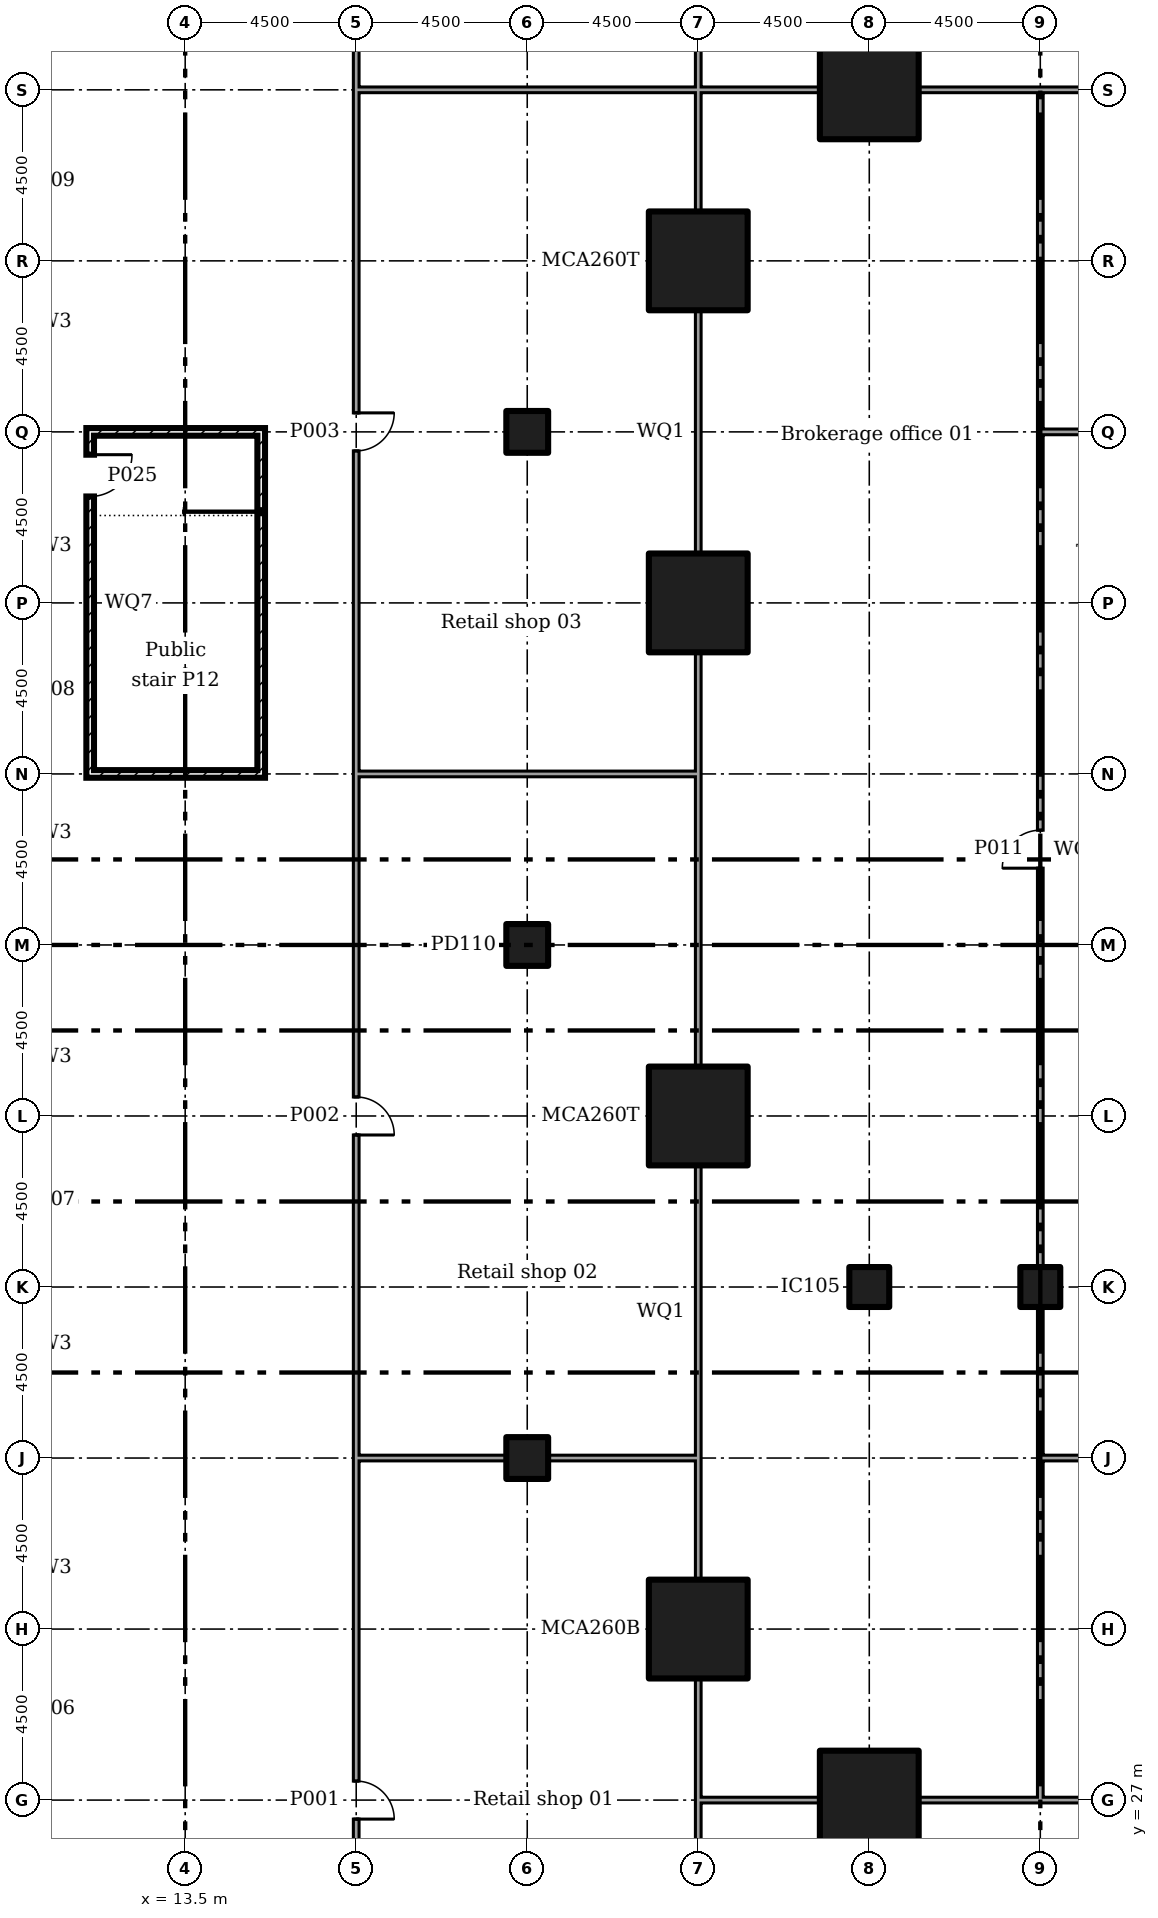
"""IFC4 building model, lengths in metres.
Left out: names, types, materials, properties, quantities, classifications, styles, units other than length and angle.
Written with IfcOpenShell. Run it as: python <this file> out.ifc"""

import sys

from ifc_helpers import new_model, si_unit, direction, frame, frame_2d, origin, origin_2d, place, context, subcontext, project, spatial, rectangle, extrude, element, fill, save


model = new_model("IFC4")
c1 = context("Model", 3, precision=1e-05, world=origin(), true_north=direction((0.0, 1.0)))
c2 = subcontext(c1, "Body", "Model", "MODEL_VIEW")
j1 = project(units=[si_unit("LENGTHUNIT", "METRE"), si_unit("PLANEANGLEUNIT", "RADIAN")], contexts=[c1])
p1 = place(None, origin())
s1 = spatial("IfcSite", under=j1, at=p1, CompositionType="ELEMENT")
p2 = place(p1, origin())
s2 = spatial("IfcBuilding", under=s1, at=p2, CompositionType="ELEMENT")
p3 = place(p2, frame((0.0, 0.0, 6.0)))
s3 = spatial("IfcBuildingStorey", under=s2, at=p3, CompositionType="ELEMENT", Elevation=6.0)
for number, where in (
    (1, (27.0, 31.5, 0.0)),
    (2, (27.0, 45.0, 0.0)),
    (3, (27.0, 58.5, 0.0)),
    (4, (27.0, 67.5, 0.0)),
    (5, (31.5, 27.0, 0.0)),
    (6, (31.5, 72.0, 0.0)),
):
    element("IfcColumn", number, at=place(p3, frame(where)), inside=s3, PredefinedType="COLUMN", context=c2, shape_type="SweptSolid", body=[
        extrude(rectangle(XDim=2.6, YDim=2.6, at=origin_2d()), origin(), (0.0, 0.0, 1.0), 5.5),
    ])
for number, where in (
    (7, (31.5, 40.5, 0.0)),
    (8, (36.0, 40.5, 0.0)),
):
    element("IfcColumn", number, at=place(p3, frame(where)), inside=s3, PredefinedType="COLUMN", context=c2, shape_type="SweptSolid", body=[
        extrude(rectangle(XDim=1.05, YDim=1.05, at=origin_2d()), origin(), (0.0, 0.0, 1.0), 5.5),
    ])
for number, where in (
    (9, (22.5, 36.0, 0.0)),
    (10, (22.5, 49.5, 0.0)),
    (11, (22.5, 63.0, 0.0)),
):
    element("IfcColumn", number, at=place(p3, frame(where)), inside=s3, PredefinedType="COLUMN", context=c2, shape_type="SweptSolid", body=[
        extrude(rectangle(XDim=1.1, YDim=1.1, at=origin_2d()), origin(), (0.0, 0.0, 1.0), 5.5),
    ])
p4 = place(p3, frame((18.0, 18.0, 0.0), z_axis=(0.0, 0.0, 1.0), x_axis=(0.0, 1.0, 0.0)))
e12 = element("IfcWall", 12, at=p4, inside=s3, PredefinedType="PARTITIONING", context=c2, shape_type="SweptSolid", body=[
    extrude(rectangle(XDim=18.075, YDim=0.15, at=frame_2d((9.038, 0.0))), origin(), (0.0, 0.0, 1.0), 5.05),
])
p5 = place(p4, frame((8.5, 0.0, 0.0)))
e13 = element("IfcOpeningElement", 13, at=p5, cuts=e12, PredefinedType="OPENING", context=c2, shape_type="SweptSolid", body=[
    extrude(rectangle(XDim=1.0, YDim=2.1, at=frame_2d((0.5, 1.05))), frame((0.0, 0.085, 0.0), z_axis=(0.0, -1.0, 0.0), x_axis=(1.0, 0.0, 0.0)), (0.0, 0.0, 1.0), 0.17),
])
p6 = place(p3, frame((18.0, 36.0, 0.0), z_axis=(0.0, 0.0, 1.0), x_axis=(0.0, 1.0, 0.0)))
e14 = element("IfcWall", 14, at=p6, inside=s3, PredefinedType="PARTITIONING", context=c2, shape_type="SweptSolid", body=[
    extrude(rectangle(XDim=18.075, YDim=0.15, at=frame_2d((9.038, 0.0))), origin(), (0.0, 0.0, 1.0), 5.05),
])
p7 = place(p6, frame((8.5, 0.0, 0.0)))
e15 = element("IfcOpeningElement", 15, at=p7, cuts=e14, PredefinedType="OPENING", context=c2, shape_type="SweptSolid", body=[
    extrude(rectangle(XDim=1.0, YDim=2.1, at=frame_2d((0.5, 1.05))), frame((0.0, 0.085, 0.0), z_axis=(0.0, -1.0, 0.0), x_axis=(1.0, 0.0, 0.0)), (0.0, 0.0, 1.0), 0.17),
])
p8 = place(p3, frame((18.0, 54.0, 0.0), z_axis=(0.0, 0.0, 1.0), x_axis=(0.0, 1.0, 0.0)))
e16 = element("IfcWall", 16, at=p8, inside=s3, PredefinedType="PARTITIONING", context=c2, shape_type="SweptSolid", body=[
    extrude(rectangle(XDim=18.075, YDim=0.15, at=frame_2d((9.038, 0.0))), origin(), (0.0, 0.0, 1.0), 5.05),
])
p9 = place(p8, frame((8.5, 0.0, 0.0)))
e17 = element("IfcOpeningElement", 17, at=p9, cuts=e16, PredefinedType="OPENING", context=c2, shape_type="SweptSolid", body=[
    extrude(rectangle(XDim=1.0, YDim=2.1, at=frame_2d((0.5, 1.05))), frame((0.0, 0.085, 0.0), z_axis=(0.0, -1.0, 0.0), x_axis=(1.0, 0.0, 0.0)), (0.0, 0.0, 1.0), 0.17),
])
p10 = place(p3, frame((18.0, 72.0, 0.0), z_axis=(0.0, 0.0, 1.0), x_axis=(0.0, 1.0, 0.0)))
e18 = element("IfcWall", 18, at=p10, inside=s3, PredefinedType="PARTITIONING", context=c2, shape_type="SweptSolid", body=[
    extrude(rectangle(XDim=9.0, YDim=0.15, at=frame_2d((4.5, 0.0))), origin(), (0.0, 0.0, 1.0), 5.05),
])
p11 = place(p10, frame((4.0, 0.0, 0.0)))
e19 = element("IfcOpeningElement", 19, at=p11, cuts=e18, PredefinedType="OPENING", context=c2, shape_type="SweptSolid", body=[
    extrude(rectangle(XDim=1.0, YDim=2.1, at=frame_2d((0.5, 1.05))), frame((0.0, 0.085, 0.0), z_axis=(0.0, -1.0, 0.0), x_axis=(1.0, 0.0, 0.0)), (0.0, 0.0, 1.0), 0.17),
])
p12 = place(p3, frame((11.0, 53.9, 0.0), z_axis=(0.0, 0.0, 1.0), x_axis=(0.0, 1.0, 0.0)))
e20 = element("IfcWall", 20, at=p12, inside=s3, PredefinedType="SOLIDWALL", context=c2, shape_type="SweptSolid", body=[
    extrude(rectangle(XDim=9.2, YDim=0.2, at=frame_2d((4.6, 0.0))), origin(), (0.0, 0.0, 1.0), 5.05),
])
p13 = place(p12, frame((7.4, 0.0, 0.0)))
e21 = element("IfcOpeningElement", 21, at=p13, cuts=e20, PredefinedType="OPENING", context=c2, shape_type="SweptSolid", body=[
    extrude(rectangle(XDim=1.1, YDim=2.1, at=frame_2d((0.55, 1.05))), frame((0.0, 0.11, 0.0), z_axis=(0.0, -1.0, 0.0), x_axis=(1.0, 0.0, 0.0)), (0.0, 0.0, 1.0), 0.22),
])
p14 = place(p3, frame((15.5, 53.9, 0.0), z_axis=(0.0, 0.0, 1.0), x_axis=(0.0, 1.0, 0.0)))
e22 = element("IfcWall", 22, at=p14, inside=s3, PredefinedType="SOLIDWALL", context=c2, shape_type="SweptSolid", body=[
    extrude(rectangle(XDim=9.2, YDim=0.2, at=frame_2d((4.6, 0.0))), origin(), (0.0, 0.0, 1.0), 5.05),
])
for number, where in (
    (23, (11.1, 54.0, 0.0)),
    (24, (11.1, 63.0, 0.0)),
):
    element("IfcWall", number, at=place(p3, frame(where)), inside=s3, PredefinedType="SOLIDWALL", context=c2, shape_type="SweptSolid", body=[
        extrude(rectangle(XDim=4.3, YDim=0.2, at=frame_2d((2.15, 0.0))), origin(), (0.0, 0.0, 1.0), 5.05),
    ])
p15 = place(p3, frame((18.075, 36.0, 0.0)))
e25 = element("IfcWall", 25, at=p15, inside=s3, PredefinedType="PARTITIONING", context=c2, shape_type="SweptSolid", body=[
    extrude(rectangle(XDim=3.88, YDim=0.15, at=frame_2d((1.94, 0.0))), origin(), (0.0, 0.0, 1.0), 5.05),
])
p16 = place(p3, frame((23.045, 36.0, 0.0)))
e26 = element("IfcWall", 26, at=p16, inside=s3, PredefinedType="PARTITIONING", context=c2, shape_type="SweptSolid", body=[
    extrude(rectangle(XDim=4.03, YDim=0.15, at=frame_2d((2.015, 0.0))), origin(), (0.0, 0.0, 1.0), 5.05),
])
p17 = place(p3, frame((27.0, 18.075, 0.0), z_axis=(0.0, 0.0, 1.0), x_axis=(0.0, 1.0, 0.0)))
e27 = element("IfcWall", 27, at=p17, inside=s3, PredefinedType="PARTITIONING", context=c2, shape_type="SweptSolid", body=[
    extrude(rectangle(XDim=9.0, YDim=0.15, at=frame_2d((4.5, 0.0))), origin(), (0.0, 0.0, 1.0), 5.05),
])
p18 = place(p3, frame((27.0, 27.0, 0.0), z_axis=(0.0, 0.0, 1.0), x_axis=(0.0, 1.0, 0.0)))
e28 = element("IfcWall", 28, at=p18, inside=s3, PredefinedType="PARTITIONING", context=c2, shape_type="SweptSolid", body=[
    extrude(rectangle(XDim=3.205, YDim=0.15, at=frame_2d((1.603, 0.0))), origin(), (0.0, 0.0, 1.0), 5.05),
])
p19 = place(p3, frame((27.0, 32.795, 0.0), z_axis=(0.0, 0.0, 1.0), x_axis=(0.0, 1.0, 0.0)))
e29 = element("IfcWall", 29, at=p19, inside=s3, PredefinedType="PARTITIONING", context=c2, shape_type="SweptSolid", body=[
    extrude(rectangle(XDim=3.13, YDim=0.15, at=frame_2d((1.565, 0.0))), origin(), (0.0, 0.0, 1.0), 5.05),
])
p20 = place(p3, frame((18.075, 54.0, 0.0)))
e30 = element("IfcWall", 30, at=p20, inside=s3, PredefinedType="PARTITIONING", context=c2, shape_type="SweptSolid", body=[
    extrude(rectangle(XDim=9.0, YDim=0.15, at=frame_2d((4.5, 0.0))), origin(), (0.0, 0.0, 1.0), 5.05),
])
p21 = place(p3, frame((27.0, 36.0, 0.0), z_axis=(0.0, 0.0, 1.0), x_axis=(0.0, 1.0, 0.0)))
e31 = element("IfcWall", 31, at=p21, inside=s3, PredefinedType="PARTITIONING", context=c2, shape_type="SweptSolid", body=[
    extrude(rectangle(XDim=7.705, YDim=0.15, at=frame_2d((3.853, 0.0))), origin(), (0.0, 0.0, 1.0), 5.05),
])
p22 = place(p3, frame((27.0, 46.295, 0.0), z_axis=(0.0, 0.0, 1.0), x_axis=(0.0, 1.0, 0.0)))
e32 = element("IfcWall", 32, at=p22, inside=s3, PredefinedType="PARTITIONING", context=c2, shape_type="SweptSolid", body=[
    extrude(rectangle(XDim=7.63, YDim=0.15, at=frame_2d((3.815, 0.0))), origin(), (0.0, 0.0, 1.0), 5.05),
])
p23 = place(p3, frame((18.075, 72.0, 0.0)))
e33 = element("IfcWall", 33, at=p23, inside=s3, PredefinedType="PARTITIONING", context=c2, shape_type="SweptSolid", body=[
    extrude(rectangle(XDim=9.0, YDim=0.15, at=frame_2d((4.5, 0.0))), origin(), (0.0, 0.0, 1.0), 5.05),
])
p24 = place(p3, frame((27.0, 54.0, 0.0), z_axis=(0.0, 0.0, 1.0), x_axis=(0.0, 1.0, 0.0)))
e34 = element("IfcWall", 34, at=p24, inside=s3, PredefinedType="PARTITIONING", context=c2, shape_type="SweptSolid", body=[
    extrude(rectangle(XDim=3.205, YDim=0.15, at=frame_2d((1.603, 0.0))), origin(), (0.0, 0.0, 1.0), 5.05),
])
p25 = place(p3, frame((27.0, 59.795, 0.0), z_axis=(0.0, 0.0, 1.0), x_axis=(0.0, 1.0, 0.0)))
e35 = element("IfcWall", 35, at=p25, inside=s3, PredefinedType="PARTITIONING", context=c2, shape_type="SweptSolid", body=[
    extrude(rectangle(XDim=6.41, YDim=0.15, at=frame_2d((3.205, 0.0))), origin(), (0.0, 0.0, 1.0), 5.05),
])
p26 = place(p3, frame((27.0, 68.795, 0.0), z_axis=(0.0, 0.0, 1.0), x_axis=(0.0, 1.0, 0.0)))
e36 = element("IfcWall", 36, at=p26, inside=s3, PredefinedType="PARTITIONING", context=c2, shape_type="SweptSolid", body=[
    extrude(rectangle(XDim=3.13, YDim=0.15, at=frame_2d((1.565, 0.0))), origin(), (0.0, 0.0, 1.0), 5.05),
])
p27 = place(p3, frame((27.0, 71.925, 0.0), z_axis=(0.0, 0.0, 1.0), x_axis=(0.0, 1.0, 0.0)))
e37 = element("IfcWall", 37, at=p27, inside=s3, PredefinedType="PARTITIONING", context=c2, shape_type="SweptSolid", body=[
    extrude(rectangle(XDim=9.0, YDim=0.15, at=frame_2d((4.5, 0.0))), origin(), (0.0, 0.0, 1.0), 5.05),
])
p28 = place(p3, frame((27.075, 27.0, 0.0)))
e38 = element("IfcWall", 38, at=p28, inside=s3, PredefinedType="PARTITIONING", context=c2, shape_type="SweptSolid", body=[
    extrude(rectangle(XDim=3.13, YDim=0.15, at=frame_2d((1.565, 0.0))), origin(), (0.0, 0.0, 1.0), 5.05),
])
p29 = place(p3, frame((32.795, 27.0, 0.0)))
e39 = element("IfcWall", 39, at=p29, inside=s3, PredefinedType="PARTITIONING", context=c2, shape_type="SweptSolid", body=[
    extrude(rectangle(XDim=3.28, YDim=0.15, at=frame_2d((1.64, 0.0))), origin(), (0.0, 0.0, 1.0), 5.05),
])
p30 = place(p3, frame((36.0, 27.0, 0.0)))
e40 = element("IfcWall", 40, at=p30, inside=s3, PredefinedType="PARTITIONING", context=c2, shape_type="SweptSolid", body=[
    extrude(rectangle(XDim=7.705, YDim=0.15, at=frame_2d((3.853, 0.0))), origin(), (0.0, 0.0, 1.0), 5.05),
])
p31 = place(p3, frame((27.075, 72.0, 0.0)))
e41 = element("IfcWall", 41, at=p31, inside=s3, PredefinedType="PARTITIONING", context=c2, shape_type="SweptSolid", body=[
    extrude(rectangle(XDim=3.13, YDim=0.15, at=frame_2d((1.565, 0.0))), origin(), (0.0, 0.0, 1.0), 5.05),
])
p32 = place(p3, frame((32.795, 72.0, 0.0)))
e42 = element("IfcWall", 42, at=p32, inside=s3, PredefinedType="PARTITIONING", context=c2, shape_type="SweptSolid", body=[
    extrude(rectangle(XDim=3.28, YDim=0.15, at=frame_2d((1.64, 0.0))), origin(), (0.0, 0.0, 1.0), 5.05),
])
p33 = place(p3, frame((36.0, 72.0, 0.0)))
e43 = element("IfcWall", 43, at=p33, inside=s3, PredefinedType="PARTITIONING", context=c2, shape_type="SweptSolid", body=[
    extrude(rectangle(XDim=7.705, YDim=0.15, at=frame_2d((3.853, 0.0))), origin(), (0.0, 0.0, 1.0), 5.05),
])
for number, where, z_axis, x_axis in (
    (44, (36.0, 27.075, 0.0), (0.0, 0.0, 1.0), (0.0, 1.0, 0.0)),
    (45, (36.0, 62.925, 0.0), (0.0, 0.0, 1.0), (0.0, 1.0, 0.0)),
):
    element("IfcWall", number, at=place(p3, frame(where, z_axis=z_axis, x_axis=x_axis)), inside=s3, PredefinedType="PARTITIONING", context=c2, shape_type="SweptSolid", body=[
        extrude(rectangle(XDim=9.0, YDim=0.15, at=frame_2d((4.5, 0.0))), origin(), (0.0, 0.0, 1.0), 5.05),
    ])
p34 = place(p3, frame((36.0, 36.0, 0.0), z_axis=(0.0, 0.0, 1.0), x_axis=(0.0, 1.0, 0.0)))
e46 = element("IfcWall", 46, at=p34, inside=s3, PredefinedType="PARTITIONING", context=c2, shape_type="SweptSolid", body=[
    extrude(rectangle(XDim=3.98, YDim=0.15, at=frame_2d((1.99, 0.0))), origin(), (0.0, 0.0, 1.0), 5.05),
])
p35 = place(p3, frame((36.0, 41.02, 0.0), z_axis=(0.0, 0.0, 1.0), x_axis=(0.0, 1.0, 0.0)))
e47 = element("IfcWall", 47, at=p35, inside=s3, PredefinedType="PARTITIONING", context=c2, shape_type="SweptSolid", body=[
    extrude(rectangle(XDim=21.98, YDim=0.15, at=frame_2d((10.99, 0.0))), origin(), (0.0, 0.0, 1.0), 5.05),
])
p36 = place(p35, frame((10.5, 0.0, 0.0)))
e48 = element("IfcOpeningElement", 48, at=p36, cuts=e47, PredefinedType="OPENING", context=c2, shape_type="SweptSolid", body=[
    extrude(rectangle(XDim=1.0, YDim=2.1, at=frame_2d((0.5, 1.05))), frame((0.0, 0.085, 0.0), z_axis=(0.0, -1.0, 0.0), x_axis=(1.0, 0.0, 0.0)), (0.0, 0.0, 1.0), 0.17),
])
p37 = place(p3, frame((36.075, 36.0, 0.0)))
e49 = element("IfcWall", 49, at=p37, inside=s3, PredefinedType="PARTITIONING", context=c2, shape_type="SweptSolid", body=[
    extrude(rectangle(XDim=21.905, YDim=0.15, at=frame_2d((10.953, 0.0))), origin(), (0.0, 0.0, 1.0), 5.05),
])
p38 = place(p37, frame((10.425, 0.0, 0.0)))
e50 = element("IfcOpeningElement", 50, at=p38, cuts=e49, PredefinedType="OPENING", context=c2, shape_type="SweptSolid", body=[
    extrude(rectangle(XDim=1.0, YDim=2.1, at=frame_2d((0.5, 1.05))), frame((0.0, 0.085, 0.0), z_axis=(0.0, -1.0, 0.0), x_axis=(1.0, 0.0, 0.0)), (0.0, 0.0, 1.0), 0.17),
])
p39 = place(p3, frame((36.075, 63.0, 0.0)))
e51 = element("IfcWall", 51, at=p39, inside=s3, PredefinedType="PARTITIONING", context=c2, shape_type="SweptSolid", body=[
    extrude(rectangle(XDim=3.905, YDim=0.15, at=frame_2d((1.953, 0.0))), origin(), (0.0, 0.0, 1.0), 5.05),
])
p40 = place(p5, frame((1.0, 0.0, 0.0), x_axis=(-1.0, 0.0, 0.0)))
e52 = element("IfcDoor", 52, at=p40, inside=s3, OperationType="SINGLE_SWING_LEFT", PredefinedType="DOOR", context=c2, shape_type="SweptSolid", body=[
    extrude(rectangle(XDim=1.0, YDim=2.1, at=frame_2d((0.5, 1.05))), frame((0.0, 0.025, 0.0), z_axis=(0.0, -1.0, 0.0), x_axis=(1.0, 0.0, 0.0)), (0.0, 0.0, 1.0), 0.05),
])
fill(e13, e52)
p41 = place(p7, frame((1.0, 0.0, 0.0), x_axis=(-1.0, 0.0, 0.0)))
e53 = element("IfcDoor", 53, at=p41, inside=s3, OperationType="SINGLE_SWING_LEFT", PredefinedType="DOOR", context=c2, shape_type="SweptSolid", body=[
    extrude(rectangle(XDim=1.0, YDim=2.1, at=frame_2d((0.5, 1.05))), frame((0.0, 0.025, 0.0), z_axis=(0.0, -1.0, 0.0), x_axis=(1.0, 0.0, 0.0)), (0.0, 0.0, 1.0), 0.05),
])
fill(e15, e53)
p42 = place(p9, frame((1.0, 0.0, 0.0), x_axis=(-1.0, 0.0, 0.0)))
e54 = element("IfcDoor", 54, at=p42, inside=s3, OperationType="SINGLE_SWING_RIGHT", PredefinedType="DOOR", context=c2, shape_type="SweptSolid", body=[
    extrude(rectangle(XDim=1.0, YDim=2.1, at=frame_2d((0.5, 1.05))), frame((0.0, 0.025, 0.0), z_axis=(0.0, -1.0, 0.0), x_axis=(1.0, 0.0, 0.0)), (0.0, 0.0, 1.0), 0.05),
])
fill(e17, e54)
p43 = place(p36, origin())
e55 = element("IfcDoor", 55, at=p43, inside=s3, OperationType="SINGLE_SWING_RIGHT", PredefinedType="DOOR", context=c2, shape_type="SweptSolid", body=[
    extrude(rectangle(XDim=1.0, YDim=2.1, at=frame_2d((0.5, 1.05))), frame((0.0, 0.025, 0.0), z_axis=(0.0, -1.0, 0.0), x_axis=(1.0, 0.0, 0.0)), (0.0, 0.0, 1.0), 0.05),
])
fill(e48, e55)
p44 = place(p13, frame((1.1, 0.0, 0.0), x_axis=(-1.0, 0.0, 0.0)))
e56 = element("IfcDoor", 56, at=p44, inside=s3, OperationType="SINGLE_SWING_RIGHT", PredefinedType="DOOR", context=c2, shape_type="SweptSolid", body=[
    extrude(rectangle(XDim=1.1, YDim=2.1, at=frame_2d((0.55, 1.05))), frame((0.0, 0.025, 0.0), z_axis=(0.0, -1.0, 0.0), x_axis=(1.0, 0.0, 0.0)), (0.0, 0.0, 1.0), 0.05),
])
fill(e21, e56)
save(model, sys.argv[1])
